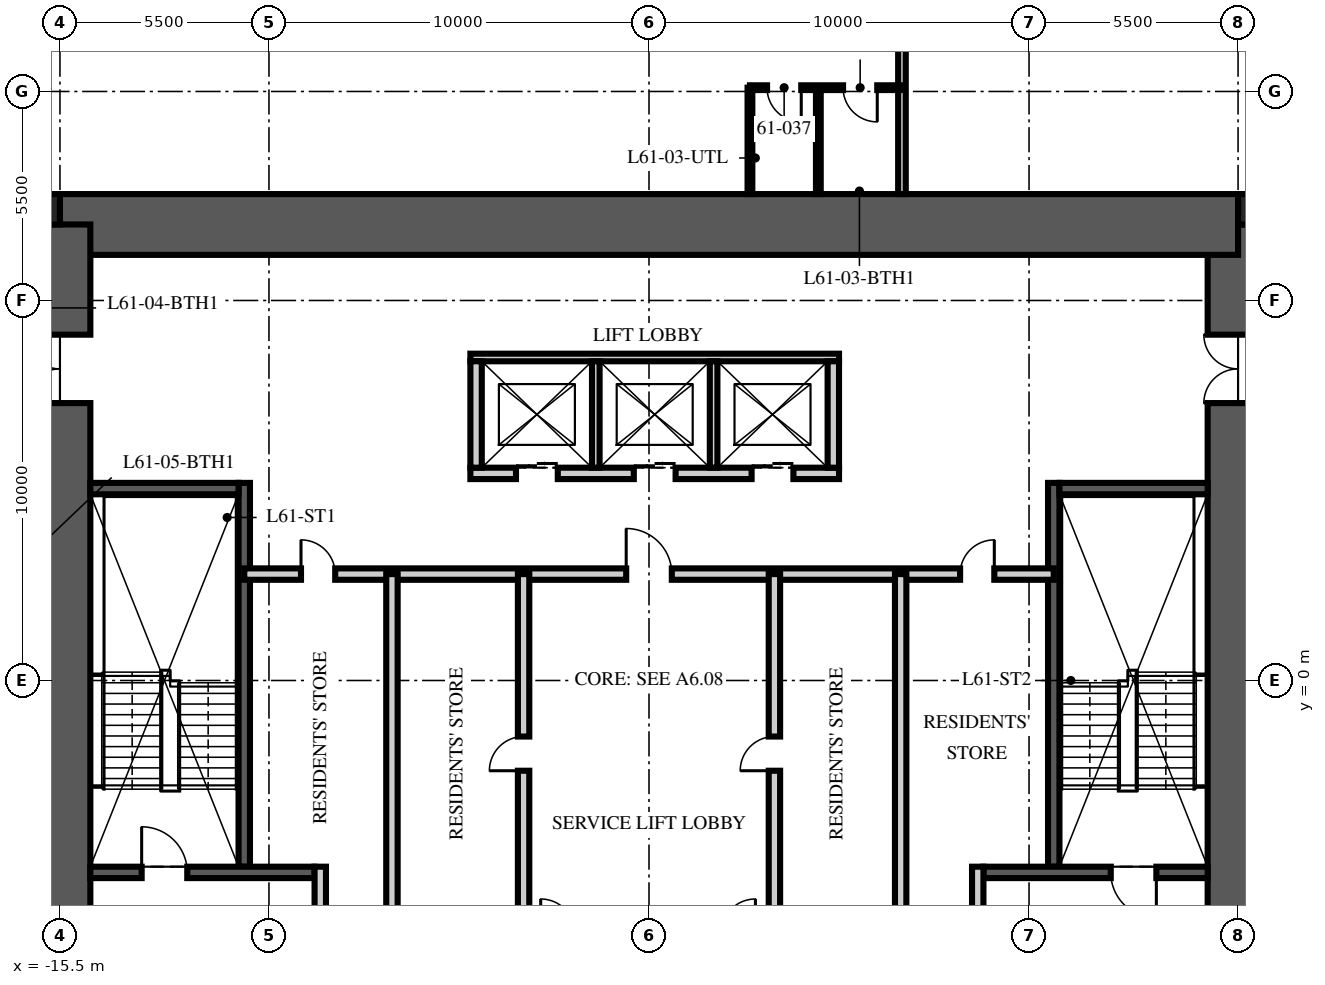
"""IFC4 building model, lengths in metres.
Left out: names, types, materials, properties, quantities, classifications, styles, units other than length and angle.
Written with IfcOpenShell. Run it as: python <this file> out.ifc"""

import sys

from ifc_helpers import new_model, si_unit, direction, frame, frame_2d, origin, origin_2d, place, context, subcontext, project, spatial, rectangle, extrude, element, fill, save


model = new_model("IFC4")
c1 = context("Model", 3, precision=1e-05, world=origin(), true_north=direction((0.0, 1.0)))
c2 = subcontext(c1, "Body", "Model", "MODEL_VIEW")
j1 = project(units=[si_unit("LENGTHUNIT", "METRE"), si_unit("PLANEANGLEUNIT", "RADIAN")], contexts=[c1])
p1 = place(None, origin())
s1 = spatial("IfcSite", under=j1, at=p1, CompositionType="ELEMENT")
p2 = place(p1, origin())
s2 = spatial("IfcBuilding", under=s1, at=p2, CompositionType="ELEMENT")
p3 = place(p2, frame((0.0, 0.0, 244.5)))
s3 = spatial("IfcBuildingStorey", under=s2, at=p3, CompositionType="ELEMENT", Elevation=244.5)
p4 = place(p3, frame((15.5, -12.0, -0.25), z_axis=(0.0, 0.0, 1.0), x_axis=(0.0, 1.0, 0.0)))
e1 = element("IfcWall", 1, at=p4, inside=s3, PredefinedType="SHEAR", context=c2, shape_type="SweptSolid", body=[
    extrude(rectangle(XDim=24.0, YDim=1.6, at=frame_2d((12.0, 0.0))), origin(), (0.0, 0.0, 1.0), 3.75),
])
p5 = place(p4, frame((3.2, 0.0, 0.25)))
e2 = element("IfcOpeningElement", 2, at=p5, cuts=e1, PredefinedType="OPENING", context=c2, shape_type="SweptSolid", body=[
    extrude(rectangle(XDim=1.2, YDim=2.1, at=frame_2d((0.6, 1.05))), frame((0.0, 0.81, 0.0), z_axis=(0.0, -1.0, 0.0), x_axis=(1.0, 0.0, 0.0)), (0.0, 0.0, 1.0), 1.62),
])
p6 = place(p4, frame((19.3, 0.0, 0.25)))
e3 = element("IfcOpeningElement", 3, at=p6, cuts=e1, PredefinedType="OPENING", context=c2, shape_type="SweptSolid", body=[
    extrude(rectangle(XDim=1.8, YDim=2.1, at=frame_2d((0.9, 1.05))), frame((0.0, 0.81, 0.0), z_axis=(0.0, -1.0, 0.0), x_axis=(1.0, 0.0, 0.0)), (0.0, 0.0, 1.0), 1.62),
])
p7 = place(p3, frame((-15.5, 12.0, -0.25), z_axis=(0.0, 0.0, 1.0), x_axis=(1.0, 0.0, 0.0)))
e4 = element("IfcWall", 4, at=p7, inside=s3, PredefinedType="SHEAR", context=c2, shape_type="SweptSolid", body=[
    extrude(rectangle(XDim=31.0, YDim=1.6, at=frame_2d((15.5, 0.0))), origin(), (0.0, 0.0, 1.0), 3.75),
])
p8 = place(p3, frame((-15.5, -12.0, -0.25), z_axis=(0.0, 0.0, 1.0), x_axis=(0.0, 1.0, 0.0)))
e5 = element("IfcWall", 5, at=p8, inside=s3, PredefinedType="SHEAR", context=c2, shape_type="SweptSolid", body=[
    extrude(rectangle(XDim=24.0, YDim=1.6, at=frame_2d((12.0, 0.0))), origin(), (0.0, 0.0, 1.0), 3.75),
])
p9 = place(p8, frame((3.2, 0.0, 0.25)))
e6 = element("IfcOpeningElement", 6, at=p9, cuts=e5, PredefinedType="OPENING", context=c2, shape_type="SweptSolid", body=[
    extrude(rectangle(XDim=1.2, YDim=2.1, at=frame_2d((0.6, 1.05))), frame((0.0, 0.81, 0.0), z_axis=(0.0, -1.0, 0.0), x_axis=(1.0, 0.0, 0.0)), (0.0, 0.0, 1.0), 1.62),
])
p10 = place(p8, frame((19.3, 0.0, 0.25)))
e7 = element("IfcOpeningElement", 7, at=p10, cuts=e5, PredefinedType="OPENING", context=c2, shape_type="SweptSolid", body=[
    extrude(rectangle(XDim=1.8, YDim=2.1, at=frame_2d((0.9, 1.05))), frame((0.0, 0.81, 0.0), z_axis=(0.0, -1.0, 0.0), x_axis=(1.0, 0.0, 0.0)), (0.0, 0.0, 1.0), 1.62),
])
for number, where, z_axis, x_axis in (
    (8, (15.9, 12.4, -0.25), (0.0, 0.0, 1.0), (1.0, 0.0, 0.0)),
    (9, (-15.9, 12.4, -0.25), (0.0, 0.0, 1.0), (1.0, 0.0, 0.0)),
):
    element("IfcColumn", number, at=place(p3, frame(where, z_axis=z_axis, x_axis=x_axis)), inside=s3, PredefinedType="COLUMN", context=c2, shape_type="SweptSolid", body=[
        extrude(rectangle(XDim=0.8, YDim=0.8, at=origin_2d()), origin(), (0.0, 0.0, 1.0), 3.75),
    ])
p11 = place(p3, frame((-10.65, -4.9, 0.0), z_axis=(0.0, 0.0, 1.0), x_axis=(0.0, 1.0, 0.0)))
e10 = element("IfcWall", 10, at=p11, inside=s3, PredefinedType="SOLIDWALL", context=c2, shape_type="SweptSolid", body=[
    extrude(rectangle(XDim=10.1, YDim=0.3, at=frame_2d((5.05, 0.0))), origin(), (0.0, 0.0, 1.0), 3.5),
])
p12 = place(p3, frame((-14.7, -5.05, 0.0), z_axis=(0.0, 0.0, 1.0), x_axis=(1.0, 0.0, 0.0)))
e11 = element("IfcWall", 11, at=p12, inside=s3, PredefinedType="SOLIDWALL", context=c2, shape_type="SweptSolid", body=[
    extrude(rectangle(XDim=5.9, YDim=0.3, at=frame_2d((2.95, 0.0))), origin(), (0.0, 0.0, 1.0), 3.5),
])
p13 = place(p12, frame((1.35, 0.0, 0.0)))
e12 = element("IfcOpeningElement", 12, at=p13, cuts=e11, PredefinedType="OPENING", context=c2, shape_type="SweptSolid", body=[
    extrude(rectangle(XDim=1.2, YDim=2.1, at=frame_2d((0.6, 1.05))), frame((0.0, 0.16, 0.0), z_axis=(0.0, -1.0, 0.0), x_axis=(1.0, 0.0, 0.0)), (0.0, 0.0, 1.0), 0.32),
])
p14 = place(p3, frame((-14.7, 5.05, 0.0), z_axis=(0.0, 0.0, 1.0), x_axis=(1.0, 0.0, 0.0)))
e13 = element("IfcWall", 13, at=p14, inside=s3, PredefinedType="SOLIDWALL", context=c2, shape_type="SweptSolid", body=[
    extrude(rectangle(XDim=3.9, YDim=0.3, at=frame_2d((1.95, 0.0))), origin(), (0.0, 0.0, 1.0), 3.5),
])
p15 = place(p3, frame((-8.65, -11.2, 0.0), z_axis=(0.0, 0.0, 1.0), x_axis=(0.0, 1.0, 0.0)))
e14 = element("IfcWall", 14, at=p15, inside=s3, PredefinedType="PARTITIONING", context=c2, shape_type="SweptSolid", body=[
    extrude(rectangle(XDim=6.3, YDim=0.3, at=frame_2d((3.15, 0.0))), origin(), (0.0, 0.0, 1.0), 3.5),
])
p16 = place(p15, frame((2.45, 0.0, 0.0)))
e15 = element("IfcOpeningElement", 15, at=p16, cuts=e14, PredefinedType="OPENING", context=c2, shape_type="SweptSolid", body=[
    extrude(rectangle(XDim=1.1, YDim=2.1, at=frame_2d((0.55, 1.05))), frame((0.0, 0.16, 0.0), z_axis=(0.0, -1.0, 0.0), x_axis=(1.0, 0.0, 0.0)), (0.0, 0.0, 1.0), 0.32),
])
p17 = place(p3, frame((10.65, -4.9, 0.0), z_axis=(0.0, 0.0, 1.0), x_axis=(0.0, 1.0, 0.0)))
e16 = element("IfcWall", 16, at=p17, inside=s3, PredefinedType="SOLIDWALL", context=c2, shape_type="SweptSolid", body=[
    extrude(rectangle(XDim=10.1, YDim=0.3, at=frame_2d((5.05, 0.0))), origin(), (0.0, 0.0, 1.0), 3.5),
])
p18 = place(p3, frame((14.7, -5.05, 0.0), z_axis=(0.0, 0.0, 1.0), x_axis=(-1.0, 0.0, 0.0)))
e17 = element("IfcWall", 17, at=p18, inside=s3, PredefinedType="SOLIDWALL", context=c2, shape_type="SweptSolid", body=[
    extrude(rectangle(XDim=5.9, YDim=0.3, at=frame_2d((2.95, 0.0))), origin(), (0.0, 0.0, 1.0), 3.5),
])
p19 = place(p18, frame((1.35, 0.0, 0.0)))
e18 = element("IfcOpeningElement", 18, at=p19, cuts=e17, PredefinedType="OPENING", context=c2, shape_type="SweptSolid", body=[
    extrude(rectangle(XDim=1.2, YDim=2.1, at=frame_2d((0.6, 1.05))), frame((0.0, 0.16, 0.0), z_axis=(0.0, -1.0, 0.0), x_axis=(1.0, 0.0, 0.0)), (0.0, 0.0, 1.0), 0.32),
])
p20 = place(p3, frame((14.7, 5.05, 0.0), z_axis=(0.0, 0.0, 1.0), x_axis=(-1.0, 0.0, 0.0)))
e19 = element("IfcWall", 19, at=p20, inside=s3, PredefinedType="SOLIDWALL", context=c2, shape_type="SweptSolid", body=[
    extrude(rectangle(XDim=3.9, YDim=0.3, at=frame_2d((1.95, 0.0))), origin(), (0.0, 0.0, 1.0), 3.5),
])
p21 = place(p3, frame((8.65, -11.2, 0.0), z_axis=(0.0, 0.0, 1.0), x_axis=(0.0, 1.0, 0.0)))
e20 = element("IfcWall", 20, at=p21, inside=s3, PredefinedType="PARTITIONING", context=c2, shape_type="SweptSolid", body=[
    extrude(rectangle(XDim=6.3, YDim=0.3, at=frame_2d((3.15, 0.0))), origin(), (0.0, 0.0, 1.0), 3.5),
])
p22 = place(p21, frame((2.45, 0.0, 0.0)))
e21 = element("IfcOpeningElement", 21, at=p22, cuts=e20, PredefinedType="OPENING", context=c2, shape_type="SweptSolid", body=[
    extrude(rectangle(XDim=1.1, YDim=2.1, at=frame_2d((0.55, 1.05))), frame((0.0, 0.16, 0.0), z_axis=(0.0, -1.0, 0.0), x_axis=(1.0, 0.0, 0.0)), (0.0, 0.0, 1.0), 0.32),
])
p23 = place(p3, frame((-4.7, 5.45, 0.0), z_axis=(0.0, 0.0, 1.0), x_axis=(1.0, 0.0, 0.0)))
e22 = element("IfcWall", 22, at=p23, inside=s3, PredefinedType="PARTITIONING", context=c2, shape_type="SweptSolid", body=[
    extrude(rectangle(XDim=9.7, YDim=0.3, at=frame_2d((4.85, 0.0))), origin(), (0.0, 0.0, 1.0), 3.5),
])
p24 = place(p23, frame((1.2, 0.0, 0.0)))
e23 = element("IfcOpeningElement", 23, at=p24, cuts=e22, PredefinedType="OPENING", context=c2, shape_type="SweptSolid", body=[
    extrude(rectangle(XDim=1.1, YDim=2.1, at=frame_2d((0.55, 1.05))), frame((0.0, 0.16, 0.0), z_axis=(0.0, -1.0, 0.0), x_axis=(1.0, 0.0, 0.0)), (0.0, 0.0, 1.0), 0.32),
])
p25 = place(p23, frame((4.3, 0.0, 0.0)))
e24 = element("IfcOpeningElement", 24, at=p25, cuts=e22, PredefinedType="OPENING", context=c2, shape_type="SweptSolid", body=[
    extrude(rectangle(XDim=1.1, YDim=2.1, at=frame_2d((0.55, 1.05))), frame((0.0, 0.16, 0.0), z_axis=(0.0, -1.0, 0.0), x_axis=(1.0, 0.0, 0.0)), (0.0, 0.0, 1.0), 0.32),
])
p26 = place(p23, frame((7.4, 0.0, 0.0)))
e25 = element("IfcOpeningElement", 25, at=p26, cuts=e22, PredefinedType="OPENING", context=c2, shape_type="SweptSolid", body=[
    extrude(rectangle(XDim=1.1, YDim=2.1, at=frame_2d((0.55, 1.05))), frame((0.0, 0.16, 0.0), z_axis=(0.0, -1.0, 0.0), x_axis=(1.0, 0.0, 0.0)), (0.0, 0.0, 1.0), 0.32),
])
p27 = place(p3, frame((-4.7, 8.5, 0.0), z_axis=(0.0, 0.0, 1.0), x_axis=(1.0, 0.0, 0.0)))
e26 = element("IfcWall", 26, at=p27, inside=s3, PredefinedType="PARTITIONING", context=c2, shape_type="SweptSolid", body=[
    extrude(rectangle(XDim=9.7, YDim=0.2, at=frame_2d((4.85, 0.0))), origin(), (0.0, 0.0, 1.0), 3.5),
])
for number, where, z_axis, x_axis in (
    (27, (-4.55, 5.6, 0.0), (0.0, 0.0, 1.0), (0.0, 1.0, 0.0)),
    (28, (4.85, 5.6, 0.0), (0.0, 0.0, 1.0), (0.0, 1.0, 0.0)),
):
    element("IfcWall", number, at=place(p3, frame(where, z_axis=z_axis, x_axis=x_axis)), inside=s3, PredefinedType="PARTITIONING", context=c2, shape_type="SweptSolid", body=[
        extrude(rectangle(XDim=2.8, YDim=0.3, at=frame_2d((1.4, 0.0))), origin(), (0.0, 0.0, 1.0), 3.5),
    ])
for number, where, z_axis, x_axis in (
    (29, (-1.4, 5.6, 0.0), (0.0, 0.0, 1.0), (0.0, 1.0, 0.0)),
    (30, (1.7, 5.6, 0.0), (0.0, 0.0, 1.0), (0.0, 1.0, 0.0)),
):
    element("IfcWall", number, at=place(p3, frame(where, z_axis=z_axis, x_axis=x_axis)), inside=s3, PredefinedType="PARTITIONING", context=c2, shape_type="SweptSolid", body=[
        extrude(rectangle(XDim=2.8, YDim=0.2, at=frame_2d((1.4, 0.0))), origin(), (0.0, 0.0, 1.0), 3.5),
    ])
p28 = place(p3, frame((-10.65, 2.8, 0.0), z_axis=(0.0, 0.0, 1.0), x_axis=(1.0, 0.0, 0.0)))
e31 = element("IfcWall", 31, at=p28, inside=s3, PredefinedType="PARTITIONING", context=c2, shape_type="SweptSolid", body=[
    extrude(rectangle(XDim=21.3, YDim=0.3, at=frame_2d((10.65, 0.0))), origin(), (0.0, 0.0, 1.0), 3.5),
])
p29 = place(p28, frame((10.05, 0.0, 0.0)))
e32 = element("IfcOpeningElement", 32, at=p29, cuts=e31, PredefinedType="OPENING", context=c2, shape_type="SweptSolid", body=[
    extrude(rectangle(XDim=1.2, YDim=2.1, at=frame_2d((0.6, 1.05))), frame((0.0, 0.16, 0.0), z_axis=(0.0, -1.0, 0.0), x_axis=(1.0, 0.0, 0.0)), (0.0, 0.0, 1.0), 0.32),
])
p30 = place(p28, frame((1.493, 0.0, 0.0)))
e33 = element("IfcOpeningElement", 33, at=p30, cuts=e31, PredefinedType="OPENING", context=c2, shape_type="SweptSolid", body=[
    extrude(rectangle(XDim=0.9, YDim=2.1, at=frame_2d((0.45, 1.05))), frame((0.0, 0.16, 0.0), z_axis=(0.0, -1.0, 0.0), x_axis=(1.0, 0.0, 0.0)), (0.0, 0.0, 1.0), 0.32),
])
p31 = place(p28, frame((18.836, 0.0, 0.0)))
e34 = element("IfcOpeningElement", 34, at=p31, cuts=e31, PredefinedType="OPENING", context=c2, shape_type="SweptSolid", body=[
    extrude(rectangle(XDim=0.9, YDim=2.1, at=frame_2d((0.45, 1.05))), frame((0.0, 0.16, 0.0), z_axis=(0.0, -1.0, 0.0), x_axis=(1.0, 0.0, 0.0)), (0.0, 0.0, 1.0), 0.32),
])
p32 = place(p3, frame((-3.3, -6.65, 0.0), z_axis=(0.0, 0.0, 1.0), x_axis=(0.0, 1.0, 0.0)))
e35 = element("IfcWall", 35, at=p32, inside=s3, PredefinedType="PARTITIONING", context=c2, shape_type="SweptSolid", body=[
    extrude(rectangle(XDim=9.45, YDim=0.3, at=frame_2d((4.725, 0.0))), origin(), (0.0, 0.0, 1.0), 3.5),
])
p33 = place(p32, frame((4.275, 0.0, 0.0)))
e36 = element("IfcOpeningElement", 36, at=p33, cuts=e35, PredefinedType="OPENING", context=c2, shape_type="SweptSolid", body=[
    extrude(rectangle(XDim=0.9, YDim=2.1, at=frame_2d((0.45, 1.05))), frame((0.0, 0.16, 0.0), z_axis=(0.0, -1.0, 0.0), x_axis=(1.0, 0.0, 0.0)), (0.0, 0.0, 1.0), 0.32),
])
p34 = place(p3, frame((3.3, -6.65, 0.0), z_axis=(0.0, 0.0, 1.0), x_axis=(0.0, 1.0, 0.0)))
e37 = element("IfcWall", 37, at=p34, inside=s3, PredefinedType="PARTITIONING", context=c2, shape_type="SweptSolid", body=[
    extrude(rectangle(XDim=9.45, YDim=0.3, at=frame_2d((4.725, 0.0))), origin(), (0.0, 0.0, 1.0), 3.5),
])
p35 = place(p34, frame((4.275, 0.0, 0.0)))
e38 = element("IfcOpeningElement", 38, at=p35, cuts=e37, PredefinedType="OPENING", context=c2, shape_type="SweptSolid", body=[
    extrude(rectangle(XDim=0.9, YDim=2.1, at=frame_2d((0.45, 1.05))), frame((0.0, 0.16, 0.0), z_axis=(0.0, -1.0, 0.0), x_axis=(1.0, 0.0, 0.0)), (0.0, 0.0, 1.0), 0.32),
])
for number, where, z_axis, x_axis in (
    (39, (-6.764, -6.65, 0.0), (0.0, 0.0, 1.0), (0.0, 1.0, 0.0)),
    (40, (6.622, -6.65, 0.0), (0.0, 0.0, 1.0), (0.0, 1.0, 0.0)),
):
    element("IfcWall", number, at=place(p3, frame(where, z_axis=z_axis, x_axis=x_axis)), inside=s3, PredefinedType="PARTITIONING", context=c2, shape_type="SweptSolid", body=[
        extrude(rectangle(XDim=9.45, YDim=0.3, at=frame_2d((4.725, 0.0))), origin(), (0.0, 0.0, 1.0), 3.5),
    ])
p36 = place(p3, frame((6.656, 12.8, 0.0), z_axis=(0.0, 0.0, 1.0), x_axis=(0.0, 1.0, 0.0)))
e41 = element("IfcWall", 41, at=p36, inside=s3, PredefinedType="PARTITIONING", context=c2, shape_type="SweptSolid", body=[
    extrude(rectangle(XDim=12.9, YDim=0.2, at=frame_2d((6.45, 0.0))), origin(), (0.0, 0.0, 1.0), 2.91),
])
p37 = place(p3, frame((6.656, 15.6, 0.0), z_axis=(0.0, 0.0, 1.0), x_axis=(-1.0, 0.0, 0.0)))
e42 = element("IfcWall", 42, at=p37, inside=s3, PredefinedType="PARTITIONING", context=c2, shape_type="SweptSolid", body=[
    extrude(rectangle(XDim=4.0, YDim=0.125, at=frame_2d((2.0, 0.0))), origin(), (0.0, 0.0, 1.0), 2.81),
])
p38 = place(p37, frame((0.65, 0.0, 0.0)))
e43 = element("IfcOpeningElement", 43, at=p38, cuts=e42, PredefinedType="OPENING", context=c2, shape_type="SweptSolid", body=[
    extrude(rectangle(XDim=0.9, YDim=2.1, at=frame_2d((0.45, 1.05))), frame((0.0, 0.073, 0.0), z_axis=(0.0, -1.0, 0.0), x_axis=(1.0, 0.0, 0.0)), (0.0, 0.0, 1.0), 0.145),
])
p39 = place(p37, frame((2.65, 0.0, 0.0)))
e44 = element("IfcOpeningElement", 44, at=p39, cuts=e42, PredefinedType="OPENING", context=c2, shape_type="SweptSolid", body=[
    extrude(rectangle(XDim=0.9, YDim=2.1, at=frame_2d((0.45, 1.05))), frame((0.0, 0.073, 0.0), z_axis=(0.0, -1.0, 0.0), x_axis=(1.0, 0.0, 0.0)), (0.0, 0.0, 1.0), 0.145),
])
for number, where, z_axis, x_axis in (
    (45, (4.456, 12.8, 0.0), (0.0, 0.0, 1.0), (0.0, 1.0, 0.0)),
    (46, (2.656, 12.8, 0.0), (0.0, 0.0, 1.0), (0.0, 1.0, 0.0)),
):
    element("IfcWall", number, at=place(p3, frame(where, z_axis=z_axis, x_axis=x_axis)), inside=s3, PredefinedType="PARTITIONING", context=c2, shape_type="SweptSolid", body=[
        extrude(rectangle(XDim=2.8, YDim=0.125, at=frame_2d((1.4, 0.0))), origin(), (0.0, 0.0, 1.0), 3.5),
    ])
p40 = place(p13, origin())
e47 = element("IfcDoor", 47, at=p40, inside=s3, OperationType="SINGLE_SWING_LEFT", PredefinedType="DOOR", context=c2, shape_type="SweptSolid", body=[
    extrude(rectangle(XDim=1.2, YDim=2.1, at=frame_2d((0.6, 1.05))), frame((0.0, 0.025, 0.0), z_axis=(0.0, -1.0, 0.0), x_axis=(1.0, 0.0, 0.0)), (0.0, 0.0, 1.0), 0.05),
])
fill(e12, e47)
p41 = place(p10, origin())
e48 = element("IfcDoor", 48, at=p41, inside=s3, OperationType="DOUBLE_DOOR_SINGLE_SWING", PredefinedType="DOOR", context=c2, shape_type="SweptSolid", body=[
    extrude(rectangle(XDim=1.8, YDim=2.1, at=frame_2d((0.9, 1.05))), frame((0.0, 0.025, 0.0), z_axis=(0.0, -1.0, 0.0), x_axis=(1.0, 0.0, 0.0)), (0.0, 0.0, 1.0), 0.05),
])
fill(e7, e48)
p42 = place(p19, origin())
e49 = element("IfcDoor", 49, at=p42, inside=s3, OperationType="SINGLE_SWING_LEFT", PredefinedType="DOOR", context=c2, shape_type="SweptSolid", body=[
    extrude(rectangle(XDim=1.2, YDim=2.1, at=frame_2d((0.6, 1.05))), frame((0.0, 0.025, 0.0), z_axis=(0.0, -1.0, 0.0), x_axis=(1.0, 0.0, 0.0)), (0.0, 0.0, 1.0), 0.05),
])
fill(e18, e49)
p43 = place(p6, origin())
e50 = element("IfcDoor", 50, at=p43, inside=s3, OperationType="DOUBLE_DOOR_SINGLE_SWING", PredefinedType="DOOR", context=c2, shape_type="SweptSolid", body=[
    extrude(rectangle(XDim=1.8, YDim=2.1, at=frame_2d((0.9, 1.05))), frame((0.0, 0.025, 0.0), z_axis=(0.0, -1.0, 0.0), x_axis=(1.0, 0.0, 0.0)), (0.0, 0.0, 1.0), 0.05),
])
fill(e3, e50)
p44 = place(p24, origin())
e51 = element("IfcDoor", 51, at=p44, inside=s3, OperationType="DOUBLE_DOOR_SLIDING", PredefinedType="DOOR", context=c2, shape_type="SweptSolid", body=[
    extrude(rectangle(XDim=1.1, YDim=2.1, at=frame_2d((0.55, 1.05))), frame((0.0, 0.025, 0.0), z_axis=(0.0, -1.0, 0.0), x_axis=(1.0, 0.0, 0.0)), (0.0, 0.0, 1.0), 0.05),
])
fill(e23, e51)
p45 = place(p25, origin())
e52 = element("IfcDoor", 52, at=p45, inside=s3, OperationType="DOUBLE_DOOR_SLIDING", PredefinedType="DOOR", context=c2, shape_type="SweptSolid", body=[
    extrude(rectangle(XDim=1.1, YDim=2.1, at=frame_2d((0.55, 1.05))), frame((0.0, 0.025, 0.0), z_axis=(0.0, -1.0, 0.0), x_axis=(1.0, 0.0, 0.0)), (0.0, 0.0, 1.0), 0.05),
])
fill(e24, e52)
p46 = place(p26, origin())
e53 = element("IfcDoor", 53, at=p46, inside=s3, OperationType="DOUBLE_DOOR_SLIDING", PredefinedType="DOOR", context=c2, shape_type="SweptSolid", body=[
    extrude(rectangle(XDim=1.1, YDim=2.1, at=frame_2d((0.55, 1.05))), frame((0.0, 0.025, 0.0), z_axis=(0.0, -1.0, 0.0), x_axis=(1.0, 0.0, 0.0)), (0.0, 0.0, 1.0), 0.05),
])
fill(e25, e53)
p47 = place(p29, origin())
e54 = element("IfcDoor", 54, at=p47, inside=s3, OperationType="SINGLE_SWING_LEFT", PredefinedType="DOOR", context=c2, shape_type="SweptSolid", body=[
    extrude(rectangle(XDim=1.2, YDim=2.1, at=frame_2d((0.6, 1.05))), frame((0.0, 0.025, 0.0), z_axis=(0.0, -1.0, 0.0), x_axis=(1.0, 0.0, 0.0)), (0.0, 0.0, 1.0), 0.05),
])
fill(e32, e54)
p48 = place(p33, origin())
e55 = element("IfcDoor", 55, at=p48, inside=s3, OperationType="SINGLE_SWING_LEFT", PredefinedType="DOOR", context=c2, shape_type="SweptSolid", body=[
    extrude(rectangle(XDim=0.9, YDim=2.1, at=frame_2d((0.45, 1.05))), frame((0.0, 0.025, 0.0), z_axis=(0.0, -1.0, 0.0), x_axis=(1.0, 0.0, 0.0)), (0.0, 0.0, 1.0), 0.05),
])
fill(e36, e55)
p49 = place(p30, origin())
e56 = element("IfcDoor", 56, at=p49, inside=s3, OperationType="SINGLE_SWING_LEFT", PredefinedType="DOOR", context=c2, shape_type="SweptSolid", body=[
    extrude(rectangle(XDim=0.9, YDim=2.1, at=frame_2d((0.45, 1.05))), frame((0.0, 0.025, 0.0), z_axis=(0.0, -1.0, 0.0), x_axis=(1.0, 0.0, 0.0)), (0.0, 0.0, 1.0), 0.05),
])
fill(e33, e56)
p50 = place(p35, origin())
e57 = element("IfcDoor", 57, at=p50, inside=s3, OperationType="SINGLE_SWING_LEFT", PredefinedType="DOOR", context=c2, shape_type="SweptSolid", body=[
    extrude(rectangle(XDim=0.9, YDim=2.1, at=frame_2d((0.45, 1.05))), frame((0.0, 0.025, 0.0), z_axis=(0.0, -1.0, 0.0), x_axis=(1.0, 0.0, 0.0)), (0.0, 0.0, 1.0), 0.05),
])
fill(e38, e57)
p51 = place(p31, origin())
e58 = element("IfcDoor", 58, at=p51, inside=s3, OperationType="SINGLE_SWING_RIGHT", PredefinedType="DOOR", context=c2, shape_type="SweptSolid", body=[
    extrude(rectangle(XDim=0.9, YDim=2.1, at=frame_2d((0.45, 1.05))), frame((0.0, 0.025, 0.0), z_axis=(0.0, -1.0, 0.0), x_axis=(1.0, 0.0, 0.0)), (0.0, 0.0, 1.0), 0.05),
])
fill(e34, e58)
p52 = place(p38, origin())
e59 = element("IfcDoor", 59, at=p52, inside=s3, OperationType="SINGLE_SWING_LEFT", PredefinedType="DOOR", context=c2, shape_type="SweptSolid", body=[
    extrude(rectangle(XDim=0.9, YDim=2.1, at=frame_2d((0.45, 1.05))), frame((0.0, 0.025, 0.0), z_axis=(0.0, -1.0, 0.0), x_axis=(1.0, 0.0, 0.0)), (0.0, 0.0, 1.0), 0.05),
])
fill(e43, e59)
p53 = place(p39, origin())
e60 = element("IfcDoor", 60, at=p53, inside=s3, OperationType="SINGLE_SWING_LEFT", PredefinedType="DOOR", context=c2, shape_type="SweptSolid", body=[
    extrude(rectangle(XDim=0.9, YDim=2.1, at=frame_2d((0.45, 1.05))), frame((0.0, 0.025, 0.0), z_axis=(0.0, -1.0, 0.0), x_axis=(1.0, 0.0, 0.0)), (0.0, 0.0, 1.0), 0.05),
])
fill(e44, e60)
save(model, sys.argv[1])
